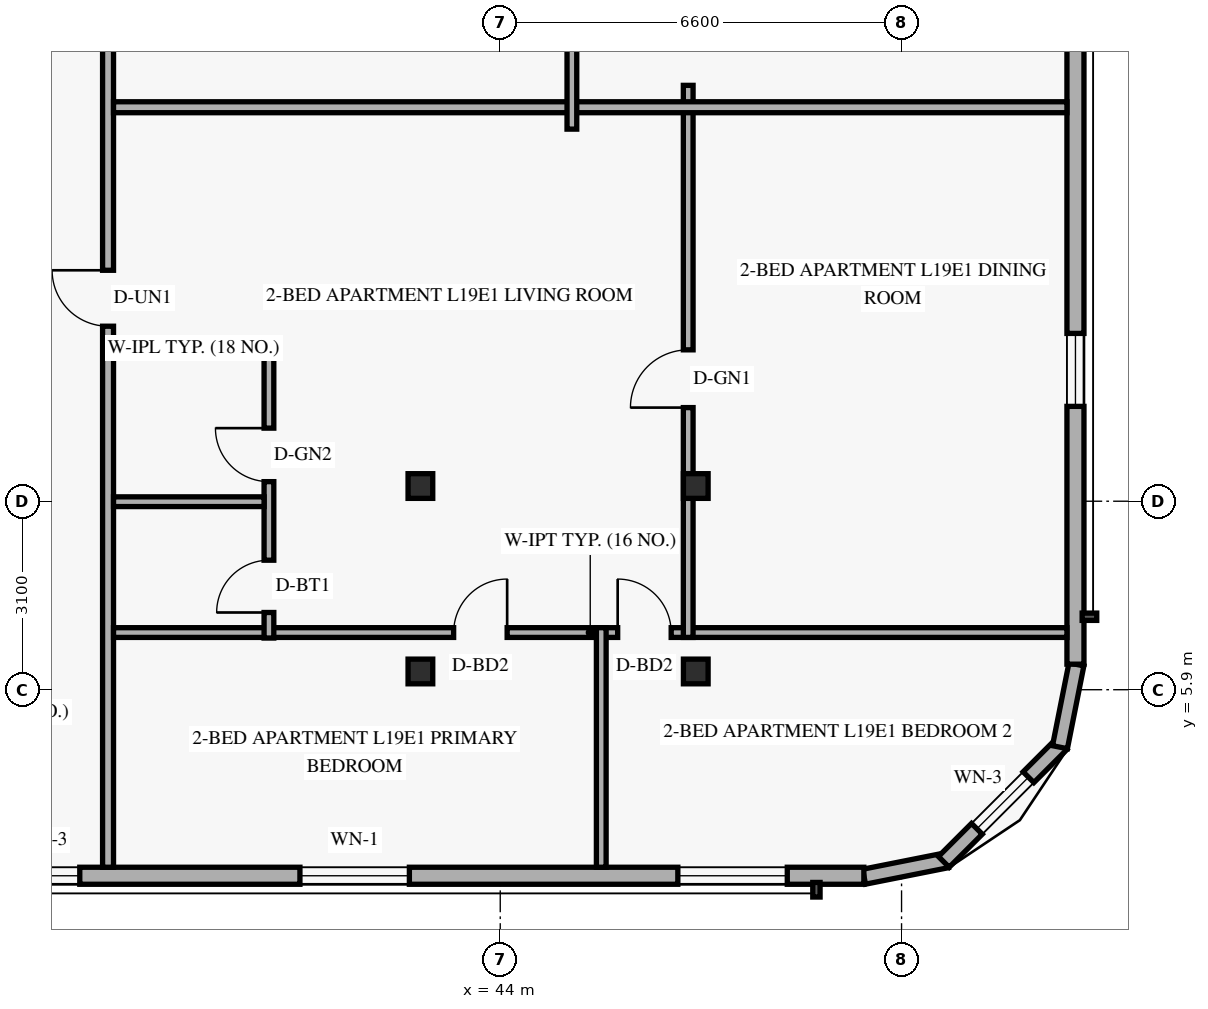
"""IFC4 building model, lengths in metres.
Left out: names, types, materials, properties, quantities, classifications, styles, units other than length and angle.
Written with IfcOpenShell. Run it as: python <this file> out.ifc"""

import sys

from ifc_helpers import new_model, si_unit, direction, frame, frame_2d, origin, origin_2d, place, context, subcontext, project, spatial, rectangle, hollow_rectangle, extrude, element, fill, save


model = new_model("IFC4")
c1 = context("Model", 3, precision=1e-05, world=origin(), true_north=direction((0.0, 1.0)))
c2 = subcontext(c1, "Body", "Model", "MODEL_VIEW")
j1 = project(units=[si_unit("LENGTHUNIT", "METRE"), si_unit("PLANEANGLEUNIT", "RADIAN")], contexts=[c1])
p1 = place(None, origin())
s1 = spatial("IfcSite", under=j1, at=p1, CompositionType="ELEMENT")
p2 = place(p1, origin())
s2 = spatial("IfcBuilding", under=s1, at=p2, CompositionType="ELEMENT")
p3 = place(p2, frame((0.0, 0.0, 76.8)))
s3 = spatial("IfcBuildingStorey", under=s2, at=p3, CompositionType="ELEMENT", Elevation=76.8)
for number, where, z_axis, x_axis in (
    (1, (42.624, 6.2, 0.0), (0.035, 0.0, 0.999), (0.0, 1.0, 0.0)),
    (2, (42.624, 9.25, 0.0), (0.035, 0.0, 0.999), (0.0, 1.0, 0.0)),
):
    element("IfcColumn", number, at=place(p3, frame(where, z_axis=z_axis, x_axis=x_axis)), inside=s3, PredefinedType="COLUMN", context=c2, shape_type="SweptSolid", body=[
        extrude(hollow_rectangle(XDim=0.406, YDim=0.406, WallThickness=0.016, at=origin_2d()), origin(), (0.0, 0.0, 1.0), 3.602),
    ])
for number, where, z_axis, x_axis in (
    (3, (47.111, 6.2, 0.0), (0.058, 0.0, 0.998), (0.0, 1.0, 0.0)),
    (4, (47.111, 9.25, 0.0), (0.058, 0.0, 0.998), (0.0, 1.0, 0.0)),
):
    element("IfcColumn", number, at=place(p3, frame(where, z_axis=z_axis, x_axis=x_axis)), inside=s3, PredefinedType="COLUMN", context=c2, shape_type="SweptSolid", body=[
        extrude(hollow_rectangle(XDim=0.406, YDim=0.406, WallThickness=0.016, at=origin_2d()), origin(), (0.0, 0.0, 1.0), 3.606),
    ])
p4 = place(p3, frame((49.983, 2.824, 0.0), z_axis=(0.0, 0.0, 1.0), x_axis=(0.980809899341, 0.19496651342, 0.0)))
e5 = element("IfcWall", 5, at=p4, inside=s3, PredefinedType="SOLIDWALL", context=c2, shape_type="SweptSolid", body=[
    extrude(rectangle(XDim=1.389, YDim=0.25, at=frame_2d((0.694, 0.0))), origin(), (0.0, 0.0, 1.0), 3.36),
])
p5 = place(p3, frame((51.295, 3.068, 0.0), z_axis=(0.0, 0.0, 1.0), x_axis=(0.707151344399, 0.707062215165, 0.0)))
e6 = element("IfcWall", 6, at=p5, inside=s3, PredefinedType="SOLIDWALL", context=c2, shape_type="SweptSolid", body=[
    extrude(rectangle(XDim=2.739, YDim=0.25, at=frame_2d((1.37, 0.0))), origin(), (0.0, 0.0, 1.0), 3.36),
])
p6 = place(p5, frame((0.77, 0.0, 0.85)))
e7 = element("IfcOpeningElement", 7, at=p6, cuts=e6, PredefinedType="OPENING", context=c2, shape_type="SweptSolid", body=[
    extrude(rectangle(XDim=1.2, YDim=1.5, at=frame_2d((0.6, 0.75))), frame((0.0, 0.135, 0.0), z_axis=(0.0, -1.0, 0.0), x_axis=(1.0, 0.0, 0.0)), (0.0, 0.0, 1.0), 0.27),
])
p7 = place(p3, frame((53.205, 4.955, 0.0), z_axis=(0.0, 0.0, 1.0), x_axis=(0.195000137217, 0.980803214965, 0.0)))
e8 = element("IfcWall", 8, at=p7, inside=s3, PredefinedType="SOLIDWALL", context=c2, shape_type="SweptSolid", body=[
    extrude(rectangle(XDim=1.388, YDim=0.25, at=frame_2d((0.694, 0.0))), origin(), (0.0, 0.0, 1.0), 3.36),
])
p8 = place(p3, frame((13.42, 2.84, 0.0), z_axis=(0.0, 0.0, 1.0), x_axis=(1.0, 0.0, 0.0)))
e9 = element("IfcWall", 9, at=p8, inside=s3, PredefinedType="SOLIDWALL", context=c2, shape_type="SweptSolid", body=[
    extrude(rectangle(XDim=36.56, YDim=0.28, at=frame_2d((18.28, 0.0))), origin(), (0.0, 0.0, 1.0), 3.36),
])
p9 = place(p8, frame((3.845, 0.0, 0.85)))
e10 = element("IfcOpeningElement", 10, at=p9, cuts=e9, PredefinedType="OPENING", context=c2, shape_type="SweptSolid", body=[
    extrude(rectangle(XDim=1.8, YDim=1.6, at=frame_2d((0.9, 0.8))), frame((0.0, 0.15, 0.0), z_axis=(0.0, -1.0, 0.0), x_axis=(1.0, 0.0, 0.0)), (0.0, 0.0, 1.0), 0.3),
])
p10 = place(p8, frame((8.68, 0.0, 0.85)))
e11 = element("IfcOpeningElement", 11, at=p10, cuts=e9, PredefinedType="OPENING", context=c2, shape_type="SweptSolid", body=[
    extrude(rectangle(XDim=1.2, YDim=1.5, at=frame_2d((0.6, 0.75))), frame((0.0, 0.15, 0.0), z_axis=(0.0, -1.0, 0.0), x_axis=(1.0, 0.0, 0.0)), (0.0, 0.0, 1.0), 0.3),
])
p11 = place(p8, frame((12.172, 0.0, 0.85)))
e12 = element("IfcOpeningElement", 12, at=p11, cuts=e9, PredefinedType="OPENING", context=c2, shape_type="SweptSolid", body=[
    extrude(rectangle(XDim=1.8, YDim=1.6, at=frame_2d((0.9, 0.8))), frame((0.0, 0.15, 0.0), z_axis=(0.0, -1.0, 0.0), x_axis=(1.0, 0.0, 0.0)), (0.0, 0.0, 1.0), 0.3),
])
p12 = place(p8, frame((18.008, 0.0, 0.85)))
e13 = element("IfcOpeningElement", 13, at=p12, cuts=e9, PredefinedType="OPENING", context=c2, shape_type="SweptSolid", body=[
    extrude(rectangle(XDim=1.8, YDim=1.6, at=frame_2d((0.9, 0.8))), frame((0.0, 0.15, 0.0), z_axis=(0.0, -1.0, 0.0), x_axis=(1.0, 0.0, 0.0)), (0.0, 0.0, 1.0), 0.3),
])
p13 = place(p8, frame((22.465, 0.0, 0.85)))
e14 = element("IfcOpeningElement", 14, at=p13, cuts=e9, PredefinedType="OPENING", context=c2, shape_type="SweptSolid", body=[
    extrude(rectangle(XDim=1.2, YDim=1.5, at=frame_2d((0.6, 0.75))), frame((0.0, 0.15, 0.0), z_axis=(0.0, -1.0, 0.0), x_axis=(1.0, 0.0, 0.0)), (0.0, 0.0, 1.0), 0.3),
])
p14 = place(p8, frame((27.286, 0.0, 0.85)))
e15 = element("IfcOpeningElement", 15, at=p14, cuts=e9, PredefinedType="OPENING", context=c2, shape_type="SweptSolid", body=[
    extrude(rectangle(XDim=1.8, YDim=1.6, at=frame_2d((0.9, 0.8))), frame((0.0, 0.15, 0.0), z_axis=(0.0, -1.0, 0.0), x_axis=(1.0, 0.0, 0.0)), (0.0, 0.0, 1.0), 0.3),
])
p15 = place(p8, frame((33.501, 0.0, 0.85)))
e16 = element("IfcOpeningElement", 16, at=p15, cuts=e9, PredefinedType="OPENING", context=c2, shape_type="SweptSolid", body=[
    extrude(rectangle(XDim=1.8, YDim=1.6, at=frame_2d((0.9, 0.8))), frame((0.0, 0.15, 0.0), z_axis=(0.0, -1.0, 0.0), x_axis=(1.0, 0.0, 0.0)), (0.0, 0.0, 1.0), 0.3),
])
p16 = place(p3, frame((53.46, 6.32, 0.0), z_axis=(0.0, 0.0, 1.0), x_axis=(0.0, 1.0, 0.0)))
e17 = element("IfcWall", 17, at=p16, inside=s3, PredefinedType="SOLIDWALL", context=c2, shape_type="SweptSolid", body=[
    extrude(rectangle(XDim=35.36, YDim=0.28, at=frame_2d((17.68, 0.0))), origin(), (0.0, 0.0, 1.0), 3.36),
])
p17 = place(p16, frame((4.24, 0.0, 0.85)))
e18 = element("IfcOpeningElement", 18, at=p17, cuts=e17, PredefinedType="OPENING", context=c2, shape_type="SweptSolid", body=[
    extrude(rectangle(XDim=1.2, YDim=1.5, at=frame_2d((0.6, 0.75))), frame((0.0, 0.15, 0.0), z_axis=(0.0, -1.0, 0.0), x_axis=(1.0, 0.0, 0.0)), (0.0, 0.0, 1.0), 0.3),
])
p18 = place(p16, frame((13.982, 0.0, 0.85)))
e19 = element("IfcOpeningElement", 19, at=p18, cuts=e17, PredefinedType="OPENING", context=c2, shape_type="SweptSolid", body=[
    extrude(rectangle(XDim=1.2, YDim=1.5, at=frame_2d((0.6, 0.75))), frame((0.0, 0.15, 0.0), z_axis=(0.0, -1.0, 0.0), x_axis=(1.0, 0.0, 0.0)), (0.0, 0.0, 1.0), 0.3),
])
p19 = place(p16, frame((21.224, 0.0, 0.85)))
e20 = element("IfcOpeningElement", 20, at=p19, cuts=e17, PredefinedType="OPENING", context=c2, shape_type="SweptSolid", body=[
    extrude(rectangle(XDim=1.2, YDim=1.5, at=frame_2d((0.6, 0.75))), frame((0.0, 0.15, 0.0), z_axis=(0.0, -1.0, 0.0), x_axis=(1.0, 0.0, 0.0)), (0.0, 0.0, 1.0), 0.3),
])
p20 = place(p16, frame((25.989, 0.0, 0.85)))
e21 = element("IfcOpeningElement", 21, at=p20, cuts=e17, PredefinedType="OPENING", context=c2, shape_type="SweptSolid", body=[
    extrude(rectangle(XDim=1.2, YDim=1.5, at=frame_2d((0.6, 0.75))), frame((0.0, 0.15, 0.0), z_axis=(0.0, -1.0, 0.0), x_axis=(1.0, 0.0, 0.0)), (0.0, 0.0, 1.0), 0.3),
])
p21 = place(p16, frame((31.847, 0.0, 0.85)))
e22 = element("IfcOpeningElement", 22, at=p21, cuts=e17, PredefinedType="OPENING", context=c2, shape_type="SweptSolid", body=[
    extrude(rectangle(XDim=1.2, YDim=1.5, at=frame_2d((0.6, 0.75))), frame((0.0, 0.15, 0.0), z_axis=(0.0, -1.0, 0.0), x_axis=(1.0, 0.0, 0.0)), (0.0, 0.0, 1.0), 0.3),
])
p22 = place(p3, frame((37.55, 2.98, 0.0), z_axis=(0.0, 0.0, 1.0), x_axis=(0.0, 1.0, 0.0)))
e23 = element("IfcWall", 23, at=p22, inside=s3, PredefinedType="STANDARD", context=c2, shape_type="SweptSolid", body=[
    extrude(rectangle(XDim=42.04, YDim=0.18, at=frame_2d((21.02, 0.0))), origin(), (0.0, 0.0, 1.0), 2.731),
])
p23 = place(p22, frame((8.898, 0.0, 0.0)))
e24 = element("IfcOpeningElement", 24, at=p23, cuts=e23, PredefinedType="OPENING", context=c2, shape_type="SweptSolid", body=[
    extrude(rectangle(XDim=0.92, YDim=2.15, at=frame_2d((0.46, 1.075))), frame((0.0, 0.1, 0.0), z_axis=(0.0, -1.0, 0.0), x_axis=(1.0, 0.0, 0.0)), (0.0, 0.0, 1.0), 0.2),
])
p24 = place(p22, frame((17.337, 0.0, 0.0)))
e25 = element("IfcOpeningElement", 25, at=p24, cuts=e23, PredefinedType="OPENING", context=c2, shape_type="SweptSolid", body=[
    extrude(rectangle(XDim=0.92, YDim=2.15, at=frame_2d((0.46, 1.075))), frame((0.0, 0.1, 0.0), z_axis=(0.0, -1.0, 0.0), x_axis=(1.0, 0.0, 0.0)), (0.0, 0.0, 1.0), 0.2),
])
p25 = place(p22, frame((31.984, 0.0, 0.0)))
e26 = element("IfcOpeningElement", 26, at=p25, cuts=e23, PredefinedType="OPENING", context=c2, shape_type="SweptSolid", body=[
    extrude(rectangle(XDim=0.92, YDim=2.15, at=frame_2d((0.46, 1.075))), frame((0.0, 0.1, 0.0), z_axis=(0.0, -1.0, 0.0), x_axis=(1.0, 0.0, 0.0)), (0.0, 0.0, 1.0), 0.2),
])
p26 = place(p3, frame((37.64, 6.84, 0.0), z_axis=(0.0, 0.0, 1.0), x_axis=(1.0, 0.0, 0.0)))
e27 = element("IfcWall", 27, at=p26, inside=s3, PredefinedType="PARTITIONING", context=c2, shape_type="SweptSolid", body=[
    extrude(rectangle(XDim=15.68, YDim=0.16, at=frame_2d((7.84, 0.0))), origin(), (0.0, 0.0, 1.0), 2.731),
])
p27 = place(p26, frame((5.594, 0.0, 0.0)))
e28 = element("IfcOpeningElement", 28, at=p27, cuts=e27, PredefinedType="OPENING", context=c2, shape_type="SweptSolid", body=[
    extrude(rectangle(XDim=0.88, YDim=2.14, at=frame_2d((0.44, 1.07))), frame((0.0, 0.09, 0.0), z_axis=(0.0, -1.0, 0.0), x_axis=(1.0, 0.0, 0.0)), (0.0, 0.0, 1.0), 0.18),
])
p28 = place(p26, frame((8.291, 0.0, 0.0)))
e29 = element("IfcOpeningElement", 29, at=p28, cuts=e27, PredefinedType="OPENING", context=c2, shape_type="SweptSolid", body=[
    extrude(rectangle(XDim=0.88, YDim=2.14, at=frame_2d((0.44, 1.07))), frame((0.0, 0.09, 0.0), z_axis=(0.0, -1.0, 0.0), x_axis=(1.0, 0.0, 0.0)), (0.0, 0.0, 1.0), 0.18),
])
p29 = place(p3, frame((37.64, 11.519, 0.0), z_axis=(0.0, 0.0, 1.0), x_axis=(1.0, 0.0, 0.0)))
e30 = element("IfcWall", 30, at=p29, inside=s3, PredefinedType="PLUMBINGWALL", context=c2, shape_type="SweptSolid", body=[
    extrude(rectangle(XDim=2.636, YDim=0.16, at=frame_2d((1.318, 0.0))), origin(), (0.0, 0.0, 1.0), 3.36),
])
p30 = place(p3, frame((40.196, 6.75, 0.0), z_axis=(0.0, 0.0, 1.0), x_axis=(0.0, 1.0, 0.0)))
e31 = element("IfcWall", 31, at=p30, inside=s3, PredefinedType="PLUMBINGWALL", context=c2, shape_type="SweptSolid", body=[
    extrude(rectangle(XDim=4.858, YDim=0.16, at=frame_2d((2.429, 0.0))), origin(), (0.0, 0.0, 1.0), 2.731),
])
p31 = place(p30, frame((0.42, 0.0, 0.0)))
e32 = element("IfcOpeningElement", 32, at=p31, cuts=e31, PredefinedType="OPENING", context=c2, shape_type="SweptSolid", body=[
    extrude(rectangle(XDim=0.86, YDim=2.12, at=frame_2d((0.43, 1.06))), frame((0.0, 0.09, 0.0), z_axis=(0.0, -1.0, 0.0), x_axis=(1.0, 0.0, 0.0)), (0.0, 0.0, 1.0), 0.18),
])
p32 = place(p30, frame((2.572, 0.0, 0.0)))
e33 = element("IfcOpeningElement", 33, at=p32, cuts=e31, PredefinedType="OPENING", context=c2, shape_type="SweptSolid", body=[
    extrude(rectangle(XDim=0.88, YDim=2.12, at=frame_2d((0.44, 1.06))), frame((0.0, 0.09, 0.0), z_axis=(0.0, -1.0, 0.0), x_axis=(1.0, 0.0, 0.0)), (0.0, 0.0, 1.0), 0.18),
])
p33 = place(p3, frame((37.64, 8.992, 0.0), z_axis=(0.0, 0.0, 1.0), x_axis=(1.0, 0.0, 0.0)))
e34 = element("IfcWall", 34, at=p33, inside=s3, PredefinedType="PLUMBINGWALL", context=c2, shape_type="SweptSolid", body=[
    extrude(rectangle(XDim=2.476, YDim=0.16, at=frame_2d((1.238, 0.0))), origin(), (0.0, 0.0, 1.0), 2.731),
])
p34 = place(p3, frame((47.091, 6.76, 0.0), z_axis=(0.0, 0.0, 1.0), x_axis=(0.0, 1.0, 0.0)))
e35 = element("IfcWall", 35, at=p34, inside=s3, PredefinedType="PARTITIONING", context=c2, shape_type="SweptSolid", body=[
    extrude(rectangle(XDim=9.08, YDim=0.16, at=frame_2d((4.54, 0.0))), origin(), (0.0, 0.0, 1.0), 2.731),
])
p35 = place(p34, frame((3.78, 0.0, 0.0)))
e36 = element("IfcOpeningElement", 36, at=p35, cuts=e35, PredefinedType="OPENING", context=c2, shape_type="SweptSolid", body=[
    extrude(rectangle(XDim=0.95, YDim=2.15, at=frame_2d((0.475, 1.075))), frame((0.0, 0.09, 0.0), z_axis=(0.0, -1.0, 0.0), x_axis=(1.0, 0.0, 0.0)), (0.0, 0.0, 1.0), 0.18),
])
p36 = place(p3, frame((45.661, 2.98, 0.0), z_axis=(0.0, 0.0, 1.0), x_axis=(0.0, 1.0, 0.0)))
e37 = element("IfcWall", 37, at=p36, inside=s3, PredefinedType="PARTITIONING", context=c2, shape_type="SweptSolid", body=[
    extrude(rectangle(XDim=3.94, YDim=0.16, at=frame_2d((1.97, 0.0))), origin(), (0.0, 0.0, 1.0), 2.809),
])
p37 = place(p3, frame((37.64, 15.48, 0.0), z_axis=(0.0, 0.0, 1.0), x_axis=(1.0, 0.0, 0.0)))
e38 = element("IfcWall", 38, at=p37, inside=s3, PredefinedType="PARTITIONING", context=c2, shape_type="SweptSolid", body=[
    extrude(rectangle(XDim=15.68, YDim=0.18, at=frame_2d((7.84, 0.0))), origin(), (0.0, 0.0, 1.0), 2.731),
])
p38 = place(p3, frame((45.178, 15.12, 0.0), z_axis=(0.0, 0.0, 1.0), x_axis=(0.0, 1.0, 0.0)))
e39 = element("IfcWall", 39, at=p38, inside=s3, PredefinedType="PARTITIONING", context=c2, shape_type="SweptSolid", body=[
    extrude(rectangle(XDim=11.284, YDim=0.16, at=frame_2d((5.642, 0.0))), origin(), (0.0, 0.0, 1.0), 2.731),
])
p39 = place(p38, frame((4.882, 0.0, 0.0)))
e40 = element("IfcOpeningElement", 40, at=p39, cuts=e39, PredefinedType="OPENING", context=c2, shape_type="SweptSolid", body=[
    extrude(rectangle(XDim=0.95, YDim=2.15, at=frame_2d((0.475, 1.075))), frame((0.0, 0.09, 0.0), z_axis=(0.0, -1.0, 0.0), x_axis=(1.0, 0.0, 0.0)), (0.0, 0.0, 1.0), 0.18),
])
p40 = place(p6, origin())
e41 = element("IfcWindow", 41, at=p40, inside=s3, PartitioningType="SINGLE_PANEL", PredefinedType="WINDOW", context=c2, shape_type="SweptSolid", body=[
    extrude(rectangle(XDim=1.2, YDim=1.5, at=frame_2d((0.6, 0.75))), frame((0.0, 0.03, 0.0), z_axis=(0.0, -1.0, 0.0), x_axis=(1.0, 0.0, 0.0)), (0.0, 0.0, 1.0), 0.06),
])
fill(e7, e41)
p41 = place(p13, origin())
e42 = element("IfcWindow", 42, at=p41, inside=s3, PartitioningType="SINGLE_PANEL", PredefinedType="WINDOW", context=c2, shape_type="SweptSolid", body=[
    extrude(rectangle(XDim=1.2, YDim=1.5, at=frame_2d((0.6, 0.75))), frame((0.0, 0.03, 0.0), z_axis=(0.0, -1.0, 0.0), x_axis=(1.0, 0.0, 0.0)), (0.0, 0.0, 1.0), 0.06),
])
fill(e14, e42)
p42 = place(p14, origin())
e43 = element("IfcWindow", 43, at=p42, inside=s3, PartitioningType="SINGLE_PANEL", PredefinedType="WINDOW", context=c2, shape_type="SweptSolid", body=[
    extrude(rectangle(XDim=1.8, YDim=1.6, at=frame_2d((0.9, 0.8))), frame((0.0, 0.03, 0.0), z_axis=(0.0, -1.0, 0.0), x_axis=(1.0, 0.0, 0.0)), (0.0, 0.0, 1.0), 0.06),
])
fill(e15, e43)
p43 = place(p15, origin())
e44 = element("IfcWindow", 44, at=p43, inside=s3, PartitioningType="SINGLE_PANEL", PredefinedType="WINDOW", context=c2, shape_type="SweptSolid", body=[
    extrude(rectangle(XDim=1.8, YDim=1.6, at=frame_2d((0.9, 0.8))), frame((0.0, 0.03, 0.0), z_axis=(0.0, -1.0, 0.0), x_axis=(1.0, 0.0, 0.0)), (0.0, 0.0, 1.0), 0.06),
])
fill(e16, e44)
p44 = place(p17, origin())
e45 = element("IfcWindow", 45, at=p44, inside=s3, PartitioningType="SINGLE_PANEL", PredefinedType="WINDOW", context=c2, shape_type="SweptSolid", body=[
    extrude(rectangle(XDim=1.2, YDim=1.5, at=frame_2d((0.6, 0.75))), frame((0.0, 0.03, 0.0), z_axis=(0.0, -1.0, 0.0), x_axis=(1.0, 0.0, 0.0)), (0.0, 0.0, 1.0), 0.06),
])
fill(e18, e45)
p45 = place(p35, origin())
e46 = element("IfcDoor", 46, at=p45, inside=s3, OperationType="SINGLE_SWING_LEFT", PredefinedType="DOOR", context=c2, shape_type="SweptSolid", body=[
    extrude(rectangle(XDim=0.95, YDim=2.15, at=frame_2d((0.475, 1.075))), frame((0.0, 0.025, 0.0), z_axis=(0.0, -1.0, 0.0), x_axis=(1.0, 0.0, 0.0)), (0.0, 0.0, 1.0), 0.05),
])
fill(e36, e46)
p46 = place(p23, origin())
e47 = element("IfcDoor", 47, at=p46, inside=s3, OperationType="SINGLE_SWING_RIGHT", PredefinedType="DOOR", context=c2, shape_type="SweptSolid", body=[
    extrude(rectangle(XDim=0.92, YDim=2.15, at=frame_2d((0.46, 1.075))), frame((0.0, 0.025, 0.0), z_axis=(0.0, -1.0, 0.0), x_axis=(1.0, 0.0, 0.0)), (0.0, 0.0, 1.0), 0.05),
])
fill(e24, e47)
p47 = place(p31, origin())
e48 = element("IfcDoor", 48, at=p47, inside=s3, OperationType="SINGLE_SWING_LEFT", PredefinedType="DOOR", context=c2, shape_type="SweptSolid", body=[
    extrude(rectangle(XDim=0.86, YDim=2.12, at=frame_2d((0.43, 1.06))), frame((0.0, 0.025, 0.0), z_axis=(0.0, -1.0, 0.0), x_axis=(1.0, 0.0, 0.0)), (0.0, 0.0, 1.0), 0.05),
])
fill(e32, e48)
p48 = place(p32, origin())
e49 = element("IfcDoor", 49, at=p48, inside=s3, OperationType="SINGLE_SWING_RIGHT", PredefinedType="DOOR", context=c2, shape_type="SweptSolid", body=[
    extrude(rectangle(XDim=0.88, YDim=2.12, at=frame_2d((0.44, 1.06))), frame((0.0, 0.025, 0.0), z_axis=(0.0, -1.0, 0.0), x_axis=(1.0, 0.0, 0.0)), (0.0, 0.0, 1.0), 0.05),
])
fill(e33, e49)
p49 = place(p27, origin())
e50 = element("IfcDoor", 50, at=p49, inside=s3, OperationType="SINGLE_SWING_RIGHT", PredefinedType="DOOR", context=c2, shape_type="SweptSolid", body=[
    extrude(rectangle(XDim=0.88, YDim=2.14, at=frame_2d((0.44, 1.07))), frame((0.0, 0.025, 0.0), z_axis=(0.0, -1.0, 0.0), x_axis=(1.0, 0.0, 0.0)), (0.0, 0.0, 1.0), 0.05),
])
fill(e28, e50)
p50 = place(p28, origin())
e51 = element("IfcDoor", 51, at=p50, inside=s3, OperationType="SINGLE_SWING_LEFT", PredefinedType="DOOR", context=c2, shape_type="SweptSolid", body=[
    extrude(rectangle(XDim=0.88, YDim=2.14, at=frame_2d((0.44, 1.07))), frame((0.0, 0.025, 0.0), z_axis=(0.0, -1.0, 0.0), x_axis=(1.0, 0.0, 0.0)), (0.0, 0.0, 1.0), 0.05),
])
fill(e29, e51)
save(model, sys.argv[1])
